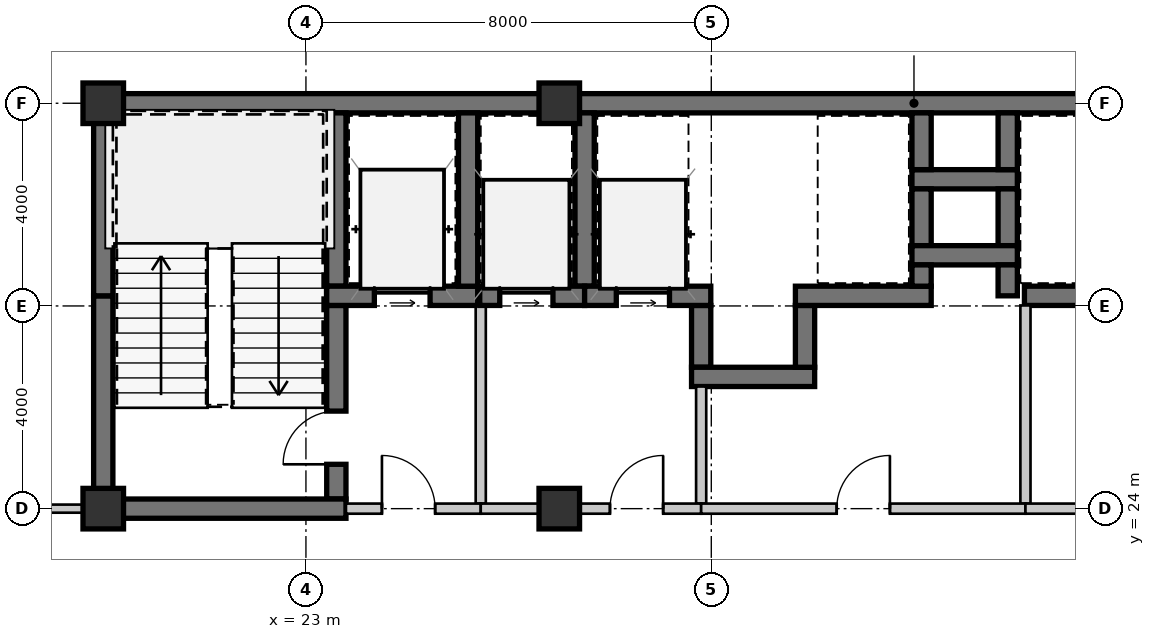
"""IFC4 building model, lengths in metres.
Left out: names, types, materials, properties, quantities, classifications, styles, units other than length and angle.
Written with IfcOpenShell. Run it as: python <this file> out.ifc"""

import sys

from ifc_helpers import new_model, si_unit, direction, frame, frame_2d, origin, origin_2d, place, context, subcontext, project, spatial, rectangle, extrude, source, transform, mapped, element, fill, save


model = new_model("IFC4")
c1 = context("Model", 3, precision=1e-05, world=origin(), true_north=direction((0.0, 1.0)))
c2 = subcontext(c1, "Body", "Model", "MODEL_VIEW")
j1 = project(units=[si_unit("LENGTHUNIT", "METRE"), si_unit("PLANEANGLEUNIT", "RADIAN")], contexts=[c1])
p1 = place(None, origin())
s1 = spatial("IfcSite", under=j1, at=p1, CompositionType="ELEMENT")
p2 = place(p1, origin())
s2 = spatial("IfcBuilding", under=s1, at=p2, CompositionType="ELEMENT")
p3 = place(p2, frame((0.0, 0.0, 51.45)))
s3 = spatial("IfcBuildingStorey", under=s2, at=p3, CompositionType="ELEMENT", Elevation=51.45)
m1 = source(origin(), c2, "Body", "SweptSolid", [
    extrude(rectangle(XDim=0.8, YDim=0.8, at=origin_2d()), origin(), (0.0, 0.0, 1.0), 3.15),
])
for number, where, z_axis, x_axis in (
    (1, (19.0, 24.0, 0.0), (0.0, 0.0, 1.0), (1.0, 0.0, 0.0)),
    (2, (28.0, 24.0, 0.0), (0.0, 0.0, 1.0), (1.0, 0.0, 0.0)),
    (3, (19.0, 32.0, 0.0), (0.0, 0.0, 1.0), (1.0, 0.0, 0.0)),
    (4, (28.0, 32.0, 0.0), (0.0, 0.0, 1.0), (1.0, 0.0, 0.0)),
):
    element("IfcColumn", number, at=place(p3, frame(where, z_axis=z_axis, x_axis=x_axis)), inside=s3, PredefinedType="COLUMN", context=c2, shape_type="MappedRepresentation", body=[
        mapped(m1, transform((0.0, 0.0, 0.0), scale=1.0)),
    ])
m2 = source(origin(), c2, "Body", "SweptSolid", [
    extrude(rectangle(XDim=9.19, YDim=0.38, at=frame_2d((4.595, 0.0))), origin(), (0.0, 0.0, 1.0), 2.93),
])
p4 = place(p3, frame((18.81, 32.0, 0.0), z_axis=(0.0, 0.0, 1.0), x_axis=(1.0, 0.0, 0.0)))
e5 = element("IfcWall", 5, at=p4, inside=s3, PredefinedType="SHEAR", context=c2, shape_type="MappedRepresentation", body=[
    mapped(m2, transform((0.0, 0.0, 0.0), scale=1.0)),
])
m3 = source(origin(), c2, "Body", "SweptSolid", [
    extrude(rectangle(XDim=11.2, YDim=0.38, at=frame_2d((5.6, 0.0))), origin(), (0.0, 0.0, 1.0), 2.93),
])
p5 = place(p3, frame((28.0, 32.0, 0.0), z_axis=(0.0, 0.0, 1.0), x_axis=(1.0, 0.0, 0.0)))
e6 = element("IfcWall", 6, at=p5, inside=s3, PredefinedType="SHEAR", context=c2, shape_type="MappedRepresentation", body=[
    mapped(m3, transform((0.0, 0.0, 0.0), scale=1.0)),
])
m4 = source(origin(), c2, "Body", "SweptSolid", [
    extrude(rectangle(XDim=4.01, YDim=0.38, at=frame_2d((2.005, 0.0))), origin(), (0.0, 0.0, 1.0), 2.93),
])
p6 = place(p3, frame((19.0, 24.19, 0.0), z_axis=(0.0, 0.0, 1.0), x_axis=(0.0, 1.0, 0.0)))
e7 = element("IfcWall", 7, at=p6, inside=s3, PredefinedType="SHEAR", context=c2, shape_type="MappedRepresentation", body=[
    mapped(m4, transform((0.0, 0.0, 0.0), scale=1.0)),
])
m5 = source(origin(), c2, "Body", "SweptSolid", [
    extrude(rectangle(XDim=3.61, YDim=0.38, at=frame_2d((1.805, 0.0))), origin(), (0.0, 0.0, 1.0), 2.93),
])
p7 = place(p3, frame((19.0, 28.2, 0.0), z_axis=(0.0, 0.0, 1.0), x_axis=(0.0, 1.0, 0.0)))
e8 = element("IfcWall", 8, at=p7, inside=s3, PredefinedType="SHEAR", context=c2, shape_type="MappedRepresentation", body=[
    mapped(m5, transform((0.0, 0.0, 0.0), scale=1.0)),
])
m6 = source(origin(), c2, "Body", "SweptSolid", [
    extrude(rectangle(XDim=3.42, YDim=0.38, at=frame_2d((1.71, 0.0))), origin(), (0.0, 0.0, 1.0), 2.93),
])
p8 = place(p3, frame((23.6, 28.39, 0.0), z_axis=(0.0, 0.0, 1.0), x_axis=(0.0, 1.0, 0.0)))
e9 = element("IfcWall", 9, at=p8, inside=s3, PredefinedType="SHEAR", context=c2, shape_type="MappedRepresentation", body=[
    mapped(m6, transform((0.0, 0.0, 0.0), scale=1.0)),
])
m7 = source(origin(), c2, "Body", "SweptSolid", [
    extrude(rectangle(XDim=3.82, YDim=0.38, at=frame_2d((1.91, 0.0))), origin(), (0.0, 0.0, 1.0), 2.93),
])
p9 = place(p3, frame((23.6, 24.19, 0.0), z_axis=(0.0, 0.0, 1.0), x_axis=(0.0, 1.0, 0.0)))
e10 = element("IfcWall", 10, at=p9, inside=s3, PredefinedType="SHEAR", context=c2, shape_type="MappedRepresentation", body=[
    mapped(m7, transform((0.0, 0.0, 0.0), scale=1.0)),
])
m8 = source(origin(), c2, "Body", "SweptSolid", [
    extrude(rectangle(XDim=1.05, YDim=2.1, at=frame_2d((0.525, 1.05))), frame((0.0, 0.2, 0.0), z_axis=(0.0, -1.0, 0.0), x_axis=(1.0, 0.0, 0.0)), (0.0, 0.0, 1.0), 0.4),
])
p10 = place(p9, frame((0.685, 0.0, 0.0)))
e11 = element("IfcOpeningElement", 11, at=p10, cuts=e10, PredefinedType="OPENING", context=c2, shape_type="MappedRepresentation", body=[
    mapped(m8, transform((0.0, 0.0, 0.0), scale=1.0)),
])
m9 = source(origin(), c2, "Body", "SweptSolid", [
    extrude(rectangle(XDim=4.98, YDim=0.38, at=frame_2d((2.49, 0.0))), origin(), (0.0, 0.0, 1.0), 2.93),
])
p11 = place(p3, frame((18.81, 24.0, 0.0), z_axis=(0.0, 0.0, 1.0), x_axis=(1.0, 0.0, 0.0)))
e12 = element("IfcWall", 12, at=p11, inside=s3, PredefinedType="SHEAR", context=c2, shape_type="MappedRepresentation", body=[
    mapped(m9, transform((0.0, 0.0, 0.0), scale=1.0)),
])
m10 = source(origin(), c2, "Body", "SweptSolid", [
    extrude(rectangle(XDim=2.98, YDim=0.38, at=frame_2d((1.49, 0.0))), origin(), (0.0, 0.0, 1.0), 2.93),
])
p12 = place(p3, frame((23.41, 28.2, 0.0), z_axis=(0.0, 0.0, 1.0), x_axis=(1.0, 0.0, 0.0)))
e13 = element("IfcWall", 13, at=p12, inside=s3, PredefinedType="SHEAR", context=c2, shape_type="MappedRepresentation", body=[
    mapped(m10, transform((0.0, 0.0, 0.0), scale=1.0)),
])
m11 = source(origin(), c2, "Body", "SweptSolid", [
    extrude(rectangle(XDim=1.1, YDim=2.15, at=frame_2d((0.55, 1.075))), frame((0.0, 0.2, 0.0), z_axis=(0.0, -1.0, 0.0), x_axis=(1.0, 0.0, 0.0)), (0.0, 0.0, 1.0), 0.4),
])
p13 = place(p12, frame((0.94, 0.0, 0.0)))
e14 = element("IfcOpeningElement", 14, at=p13, cuts=e13, PredefinedType="OPENING", context=c2, shape_type="MappedRepresentation", body=[
    mapped(m11, transform((0.0, 0.0, 0.0), scale=1.0)),
])
p14 = place(p3, frame((26.2, 28.39, 0.0), z_axis=(0.0, 0.0, 1.0), x_axis=(0.0, 1.0, 0.0)))
e15 = element("IfcWall", 15, at=p14, inside=s3, PredefinedType="SHEAR", context=c2, shape_type="MappedRepresentation", body=[
    mapped(m6, transform((0.0, 0.0, 0.0), scale=1.0)),
])
m12 = source(origin(), c2, "Body", "SweptSolid", [
    extrude(rectangle(XDim=3.91, YDim=0.2, at=frame_2d((1.955, 0.0))), origin(), (0.0, 0.0, 1.0), 2.93),
])
p15 = place(p3, frame((26.45, 24.1, 0.0), z_axis=(0.0, 0.0, 1.0), x_axis=(0.0, 1.0, 0.0)))
e16 = element("IfcWall", 16, at=p15, inside=s3, PredefinedType="SOLIDWALL", context=c2, shape_type="MappedRepresentation", body=[
    mapped(m12, transform((0.0, 0.0, 0.0), scale=1.0)),
])
m13 = source(origin(), c2, "Body", "SweptSolid", [
    extrude(rectangle(XDim=2.66, YDim=0.2, at=frame_2d((1.33, 0.0))), origin(), (0.0, 0.0, 1.0), 2.47),
])
p16 = place(p3, frame((23.79, 24.0, 0.0), z_axis=(0.0, 0.0, 1.0), x_axis=(1.0, 0.0, 0.0)))
e17 = element("IfcWall", 17, at=p16, inside=s3, PredefinedType="SOLIDWALL", context=c2, shape_type="MappedRepresentation", body=[
    mapped(m13, transform((0.0, 0.0, 0.0), scale=1.0)),
])
m14 = source(origin(), c2, "Body", "SweptSolid", [
    extrude(rectangle(XDim=1.05, YDim=2.1, at=frame_2d((0.525, 1.05))), frame((0.0, 0.11, 0.0), z_axis=(0.0, -1.0, 0.0), x_axis=(1.0, 0.0, 0.0)), (0.0, 0.0, 1.0), 0.22),
])
p17 = place(p16, frame((0.71, 0.0, 0.0)))
e18 = element("IfcOpeningElement", 18, at=p17, cuts=e17, PredefinedType="OPENING", context=c2, shape_type="MappedRepresentation", body=[
    mapped(m14, transform((0.0, 0.0, 0.0), scale=1.0)),
])
m15 = source(origin(), c2, "Body", "SweptSolid", [
    extrude(rectangle(XDim=2.08, YDim=0.38, at=frame_2d((1.04, 0.0))), origin(), (0.0, 0.0, 1.0), 2.93),
])
p18 = place(p3, frame((34.96, 30.5, 0.0), z_axis=(0.0, 0.0, 1.0), x_axis=(1.0, 0.0, 0.0)))
e19 = element("IfcWall", 19, at=p18, inside=s3, PredefinedType="SHEAR", context=c2, shape_type="MappedRepresentation", body=[
    mapped(m15, transform((0.0, 0.0, 0.0), scale=1.0)),
])
m16 = source(origin(), c2, "Body", "SweptSolid", [
    extrude(rectangle(XDim=1.12, YDim=0.38, at=frame_2d((0.56, 0.0))), origin(), (0.0, 0.0, 1.0), 2.93),
])
for number, where, z_axis, x_axis in (
    (20, (35.15, 31.81, 0.0), (0.0, 0.0, 1.0), (0.0, -1.0, 0.0)),
    (21, (36.85, 30.69, 0.0), (0.0, 0.0, 1.0), (0.0, 1.0, 0.0)),
    (22, (35.15, 30.31, 0.0), (0.0, 0.0, 1.0), (0.0, -1.0, 0.0)),
    (23, (36.85, 29.19, 0.0), (0.0, 0.0, 1.0), (0.0, 1.0, 0.0)),
):
    element("IfcWall", number, at=place(p3, frame(where, z_axis=z_axis, x_axis=x_axis)), inside=s3, PredefinedType="SHEAR", context=c2, shape_type="MappedRepresentation", body=[
        mapped(m16, transform((0.0, 0.0, 0.0), scale=1.0)),
    ])
p19 = place(p3, frame((34.96, 29.0, 0.0), z_axis=(0.0, 0.0, 1.0), x_axis=(1.0, 0.0, 0.0)))
e24 = element("IfcWall", 24, at=p19, inside=s3, PredefinedType="SHEAR", context=c2, shape_type="MappedRepresentation", body=[
    mapped(m15, transform((0.0, 0.0, 0.0), scale=1.0)),
])
m17 = source(origin(), c2, "Body", "SweptSolid", [
    extrude(rectangle(XDim=1.22, YDim=0.38, at=frame_2d((0.61, 0.0))), origin(), (0.0, 0.0, 1.0), 2.93),
])
p20 = place(p3, frame((30.8, 28.01, 0.0), z_axis=(0.0, 0.0, 1.0), x_axis=(0.0, -1.0, 0.0)))
e25 = element("IfcWall", 25, at=p20, inside=s3, PredefinedType="SHEAR", context=c2, shape_type="MappedRepresentation", body=[
    mapped(m17, transform((0.0, 0.0, 0.0), scale=1.0)),
])
m18 = source(origin(), c2, "Body", "SweptSolid", [
    extrude(rectangle(XDim=2.43, YDim=0.38, at=frame_2d((1.215, 0.0))), origin(), (0.0, 0.0, 1.0), 2.93),
])
p21 = place(p3, frame((30.61, 26.6, 0.0), z_axis=(0.0, 0.0, 1.0), x_axis=(1.0, 0.0, 0.0)))
e26 = element("IfcWall", 26, at=p21, inside=s3, PredefinedType="SHEAR", context=c2, shape_type="MappedRepresentation", body=[
    mapped(m18, transform((0.0, 0.0, 0.0), scale=1.0)),
])
p22 = place(p3, frame((32.85, 26.79, 0.0), z_axis=(0.0, 0.0, 1.0), x_axis=(0.0, 1.0, 0.0)))
e27 = element("IfcWall", 27, at=p22, inside=s3, PredefinedType="SHEAR", context=c2, shape_type="MappedRepresentation", body=[
    mapped(m17, transform((0.0, 0.0, 0.0), scale=1.0)),
])
p23 = place(p3, frame((28.5, 28.39, 0.0), z_axis=(0.0, 0.0, 1.0), x_axis=(0.0, 1.0, 0.0)))
e28 = element("IfcWall", 28, at=p23, inside=s3, PredefinedType="SHEAR", context=c2, shape_type="MappedRepresentation", body=[
    mapped(m6, transform((0.0, 0.0, 0.0), scale=1.0)),
])
m19 = source(origin(), c2, "Body", "SweptSolid", [
    extrude(rectangle(XDim=2.07, YDim=0.38, at=frame_2d((1.035, 0.0))), origin(), (0.0, 0.0, 1.0), 2.93),
])
p24 = place(p3, frame((26.43, 28.2, 0.0), z_axis=(0.0, 0.0, 1.0), x_axis=(1.0, 0.0, 0.0)))
e29 = element("IfcWall", 29, at=p24, inside=s3, PredefinedType="SHEAR", context=c2, shape_type="MappedRepresentation", body=[
    mapped(m19, transform((0.0, 0.0, 0.0), scale=1.0)),
])
m20 = source(origin(), c2, "Body", "SweptSolid", [
    extrude(rectangle(XDim=1.05, YDim=2.15, at=frame_2d((0.525, 1.075))), frame((0.0, 0.2, 0.0), z_axis=(0.0, -1.0, 0.0), x_axis=(1.0, 0.0, 0.0)), (0.0, 0.0, 1.0), 0.4),
])
p25 = place(p24, frame((0.395, 0.0, 0.0)))
e30 = element("IfcOpeningElement", 30, at=p25, cuts=e29, PredefinedType="OPENING", context=c2, shape_type="MappedRepresentation", body=[
    mapped(m20, transform((0.0, 0.0, 0.0), scale=1.0)),
])
m21 = source(origin(), c2, "Body", "SweptSolid", [
    extrude(rectangle(XDim=2.49, YDim=0.38, at=frame_2d((1.245, 0.0))), origin(), (0.0, 0.0, 1.0), 2.93),
])
p26 = place(p3, frame((28.5, 28.2, 0.0), z_axis=(0.0, 0.0, 1.0), x_axis=(1.0, 0.0, 0.0)))
e31 = element("IfcWall", 31, at=p26, inside=s3, PredefinedType="SHEAR", context=c2, shape_type="MappedRepresentation", body=[
    mapped(m21, transform((0.0, 0.0, 0.0), scale=1.0)),
])
p27 = place(p26, frame((0.625, 0.0, 0.0)))
e32 = element("IfcOpeningElement", 32, at=p27, cuts=e31, PredefinedType="OPENING", context=c2, shape_type="MappedRepresentation", body=[
    mapped(m20, transform((0.0, 0.0, 0.0), scale=1.0)),
])
m22 = source(origin(), c2, "Body", "SweptSolid", [
    extrude(rectangle(XDim=2.31, YDim=0.2, at=frame_2d((1.155, 0.0))), origin(), (0.0, 0.0, 1.0), 2.93),
])
p28 = place(p3, frame((30.8, 26.41, 0.0), z_axis=(0.0, 0.0, 1.0), x_axis=(0.0, -1.0, 0.0)))
e33 = element("IfcWall", 33, at=p28, inside=s3, PredefinedType="SOLIDWALL", context=c2, shape_type="MappedRepresentation", body=[
    mapped(m22, transform((0.0, 0.0, 0.0), scale=1.0)),
])
m23 = source(origin(), c2, "Body", "SweptSolid", [
    extrude(rectangle(XDim=4.35, YDim=0.2, at=frame_2d((2.175, 0.0))), origin(), (0.0, 0.0, 1.0), 2.47),
])
p29 = place(p3, frame((30.8, 24.0, 0.0), z_axis=(0.0, 0.0, 1.0), x_axis=(-1.0, 0.0, 0.0)))
e34 = element("IfcWall", 34, at=p29, inside=s3, PredefinedType="SOLIDWALL", context=c2, shape_type="MappedRepresentation", body=[
    mapped(m23, transform((0.0, 0.0, 0.0), scale=1.0)),
])
p30 = place(p29, frame((0.75, 0.0, 0.0)))
e35 = element("IfcOpeningElement", 35, at=p30, cuts=e34, PredefinedType="OPENING", context=c2, shape_type="MappedRepresentation", body=[
    mapped(m14, transform((0.0, 0.0, 0.0), scale=1.0)),
])
m24 = source(origin(), c2, "Body", "SweptSolid", [
    extrude(rectangle(XDim=2.68, YDim=0.38, at=frame_2d((1.34, 0.0))), origin(), (0.0, 0.0, 1.0), 2.93),
])
p31 = place(p3, frame((32.66, 28.2, 0.0), z_axis=(0.0, 0.0, 1.0), x_axis=(1.0, 0.0, 0.0)))
e36 = element("IfcWall", 36, at=p31, inside=s3, PredefinedType="SHEAR", context=c2, shape_type="MappedRepresentation", body=[
    mapped(m24, transform((0.0, 0.0, 0.0), scale=1.0)),
])
m25 = source(origin(), c2, "Body", "SweptSolid", [
    extrude(rectangle(XDim=0.42, YDim=0.38, at=frame_2d((0.21, 0.0))), origin(), (0.0, 0.0, 1.0), 2.93),
])
p32 = place(p3, frame((35.15, 28.39, 0.0), z_axis=(0.0, 0.0, 1.0), x_axis=(0.0, 1.0, 0.0)))
e37 = element("IfcWall", 37, at=p32, inside=s3, PredefinedType="SHEAR", context=c2, shape_type="MappedRepresentation", body=[
    mapped(m25, transform((0.0, 0.0, 0.0), scale=1.0)),
])
m26 = source(origin(), c2, "Body", "SweptSolid", [
    extrude(rectangle(XDim=0.61, YDim=0.38, at=frame_2d((0.305, 0.0))), origin(), (0.0, 0.0, 1.0), 2.93),
])
p33 = place(p3, frame((36.85, 28.81, 0.0), z_axis=(0.0, 0.0, 1.0), x_axis=(0.0, -1.0, 0.0)))
e38 = element("IfcWall", 38, at=p33, inside=s3, PredefinedType="SHEAR", context=c2, shape_type="MappedRepresentation", body=[
    mapped(m26, transform((0.0, 0.0, 0.0), scale=1.0)),
])
m27 = source(origin(), c2, "Body", "SweptSolid", [
    extrude(rectangle(XDim=2.02, YDim=0.38, at=frame_2d((1.01, 0.0))), origin(), (0.0, 0.0, 1.0), 2.93),
])
p34 = place(p3, frame((37.18, 28.2, 0.0), z_axis=(0.0, 0.0, 1.0), x_axis=(1.0, 0.0, 0.0)))
e39 = element("IfcWall", 39, at=p34, inside=s3, PredefinedType="SHEAR", context=c2, shape_type="MappedRepresentation", body=[
    mapped(m27, transform((0.0, 0.0, 0.0), scale=1.0)),
])
p35 = place(p3, frame((37.2, 28.01, 0.0), z_axis=(0.0, 0.0, 1.0), x_axis=(0.0, -1.0, 0.0)))
e40 = element("IfcWall", 40, at=p35, inside=s3, PredefinedType="SOLIDWALL", context=c2, shape_type="MappedRepresentation", body=[
    mapped(m12, transform((0.0, 0.0, 0.0), scale=1.0)),
])
m28 = source(origin(), c2, "Body", "SweptSolid", [
    extrude(rectangle(XDim=6.4, YDim=0.2, at=frame_2d((3.2, 0.0))), origin(), (0.0, 0.0, 1.0), 2.47),
])
p36 = place(p3, frame((37.2, 24.0, 0.0), z_axis=(0.0, 0.0, 1.0), x_axis=(-1.0, 0.0, 0.0)))
e41 = element("IfcWall", 41, at=p36, inside=s3, PredefinedType="SOLIDWALL", context=c2, shape_type="MappedRepresentation", body=[
    mapped(m28, transform((0.0, 0.0, 0.0), scale=1.0)),
])
p37 = place(p36, frame((2.675, 0.0, 0.0)))
e42 = element("IfcOpeningElement", 42, at=p37, cuts=e41, PredefinedType="OPENING", context=c2, shape_type="MappedRepresentation", body=[
    mapped(m14, transform((0.0, 0.0, 0.0), scale=1.0)),
])
m29 = source(origin(), c2, "Body", "SweptSolid", [
    extrude(rectangle(XDim=2.0, YDim=0.2, at=frame_2d((1.0, 0.0))), origin(), (0.0, 0.0, 1.0), 2.47),
])
p38 = place(p3, frame((39.2, 24.0, 0.0), z_axis=(0.0, 0.0, 1.0), x_axis=(-1.0, 0.0, 0.0)))
e43 = element("IfcWall", 43, at=p38, inside=s3, PredefinedType="SOLIDWALL", context=c2, shape_type="MappedRepresentation", body=[
    mapped(m29, transform((0.0, 0.0, 0.0), scale=1.0)),
])
m30 = source(origin(), c2, "Body", "SweptSolid", [
    extrude(rectangle(XDim=4.13, YDim=0.16, at=frame_2d((2.065, 0.0))), origin(), (0.0, 0.0, 1.0), 2.93),
])
p39 = place(p3, frame((14.68, 24.0, 0.0), z_axis=(0.0, 0.0, 1.0), x_axis=(1.0, 0.0, 0.0)))
e44 = element("IfcWall", 44, at=p39, inside=s3, PredefinedType="PARTITIONING", context=c2, shape_type="MappedRepresentation", body=[
    mapped(m30, transform((0.0, 0.0, 0.0), scale=1.0)),
])
m31 = source(origin(), c2, "Body", "SweptSolid", [
    extrude(rectangle(XDim=0.92, YDim=2.1, at=frame_2d((0.46, 1.05))), frame((0.0, 0.09, 0.0), z_axis=(0.0, -1.0, 0.0), x_axis=(1.0, 0.0, 0.0)), (0.0, 0.0, 1.0), 0.18),
])
p40 = place(p39, frame((1.69, 0.0, 0.0)))
e45 = element("IfcOpeningElement", 45, at=p40, cuts=e44, PredefinedType="OPENING", context=c2, shape_type="MappedRepresentation", body=[
    mapped(m31, transform((0.0, 0.0, 0.0), scale=1.0)),
])
m32 = source(origin(), c2, "Body", "SweptSolid", [
    extrude(rectangle(XDim=1.05, YDim=2.1, at=frame_2d((0.525, 1.05))), frame((0.0, 0.025, 0.0), z_axis=(0.0, -1.0, 0.0), x_axis=(1.0, 0.0, 0.0)), (0.0, 0.0, 1.0), 0.05),
])
p41 = place(p10, origin())
e46 = element("IfcDoor", 46, at=p41, inside=s3, OperationType="SINGLE_SWING_LEFT", PredefinedType="DOOR", context=c2, shape_type="MappedRepresentation", body=[
    mapped(m32, transform((0.0, 0.0, 0.0), scale=1.0)),
])
fill(e11, e46)
m33 = source(origin(), c2, "Body", "SweptSolid", [
    extrude(rectangle(XDim=1.1, YDim=2.15, at=frame_2d((0.55, 1.075))), frame((0.0, 0.025, 0.0), z_axis=(0.0, -1.0, 0.0), x_axis=(1.0, 0.0, 0.0)), (0.0, 0.0, 1.0), 0.05),
])
p42 = place(p13, origin())
e47 = element("IfcDoor", 47, at=p42, inside=s3, OperationType="SLIDING_TO_LEFT", PredefinedType="DOOR", context=c2, shape_type="MappedRepresentation", body=[
    mapped(m33, transform((0.0, 0.0, 0.0), scale=1.0)),
])
fill(e14, e47)
p43 = place(p17, origin())
e48 = element("IfcDoor", 48, at=p43, inside=s3, OperationType="SINGLE_SWING_LEFT", PredefinedType="DOOR", context=c2, shape_type="MappedRepresentation", body=[
    mapped(m32, transform((0.0, 0.0, 0.0), scale=1.0)),
])
fill(e18, e48)
m34 = source(origin(), c2, "Body", "SweptSolid", [
    extrude(rectangle(XDim=1.05, YDim=2.15, at=frame_2d((0.525, 1.075))), frame((0.0, 0.025, 0.0), z_axis=(0.0, -1.0, 0.0), x_axis=(1.0, 0.0, 0.0)), (0.0, 0.0, 1.0), 0.05),
])
p44 = place(p25, origin())
e49 = element("IfcDoor", 49, at=p44, inside=s3, OperationType="SLIDING_TO_LEFT", PredefinedType="DOOR", context=c2, shape_type="MappedRepresentation", body=[
    mapped(m34, transform((0.0, 0.0, 0.0), scale=1.0)),
])
fill(e30, e49)
p45 = place(p27, origin())
e50 = element("IfcDoor", 50, at=p45, inside=s3, OperationType="SLIDING_TO_LEFT", PredefinedType="DOOR", context=c2, shape_type="MappedRepresentation", body=[
    mapped(m34, transform((0.0, 0.0, 0.0), scale=1.0)),
])
fill(e32, e50)
p46 = place(p30, frame((1.05, 0.0, 0.0), z_axis=(0.0, 0.0, 1.0), x_axis=(-1.0, 0.0, 0.0)))
e51 = element("IfcDoor", 51, at=p46, inside=s3, OperationType="SINGLE_SWING_RIGHT", PredefinedType="DOOR", context=c2, shape_type="MappedRepresentation", body=[
    mapped(m32, transform((0.0, 0.0, 0.0), scale=1.0)),
])
fill(e35, e51)
p47 = place(p37, frame((1.05, 0.0, 0.0), z_axis=(0.0, 0.0, 1.0), x_axis=(-1.0, 0.0, 0.0)))
e52 = element("IfcDoor", 52, at=p47, inside=s3, OperationType="SINGLE_SWING_RIGHT", PredefinedType="DOOR", context=c2, shape_type="MappedRepresentation", body=[
    mapped(m32, transform((0.0, 0.0, 0.0), scale=1.0)),
])
fill(e42, e52)
save(model, sys.argv[1])
